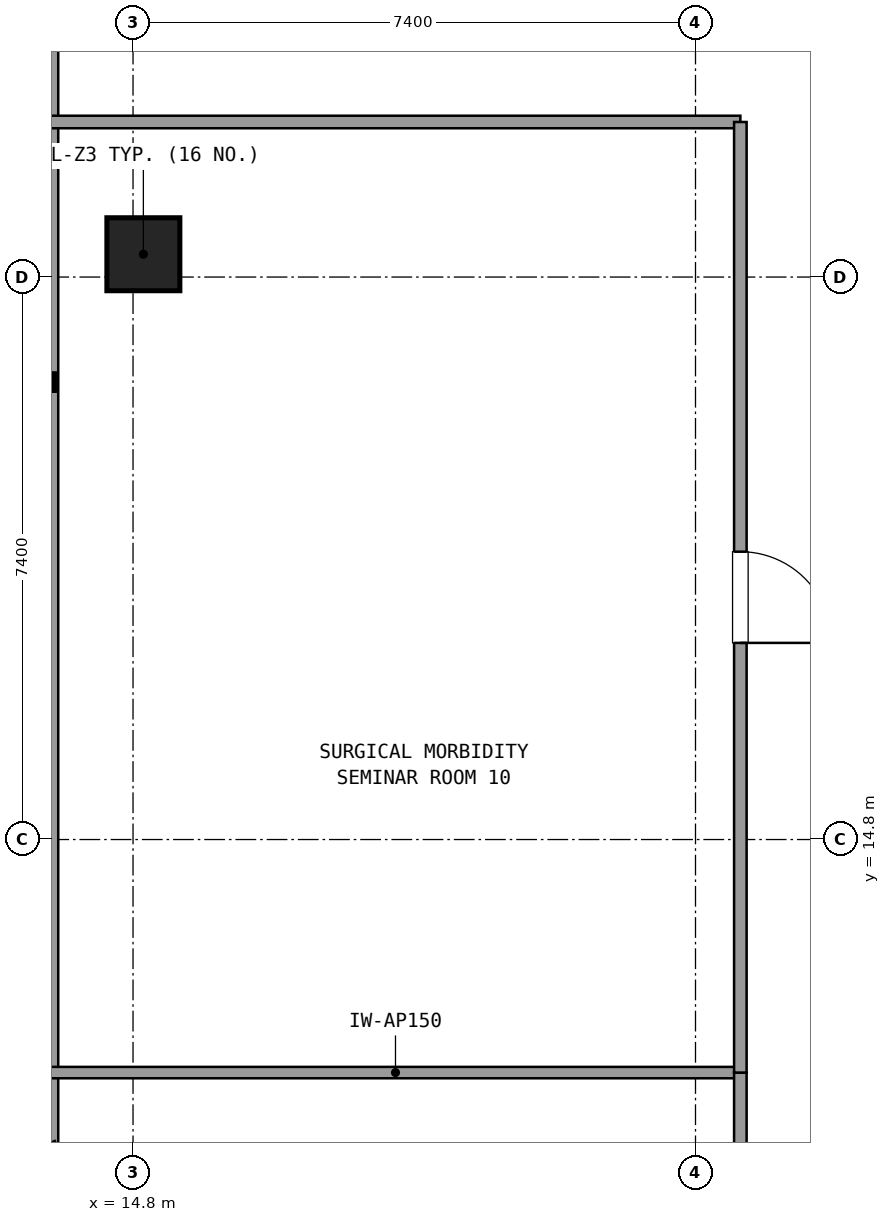
"""IFC4 building model, lengths in metres.
Left out: names, types, materials, properties, quantities, classifications, styles, units other than length and angle.
Written with IfcOpenShell. Run it as: python <this file> out.ifc"""

import sys

from ifc_helpers import new_model, si_unit, direction, frame, frame_2d, origin, origin_2d, place, context, subcontext, project, spatial, rectangle, extrude, element, fill, save


model = new_model("IFC4")
c1 = context("Model", 3, precision=1e-05, world=origin(), true_north=direction((0.0, 1.0)))
c2 = subcontext(c1, "Body", "Model", "MODEL_VIEW")
j1 = project(units=[si_unit("LENGTHUNIT", "METRE"), si_unit("PLANEANGLEUNIT", "RADIAN")], contexts=[c1])
p1 = place(None, origin())
s1 = spatial("IfcSite", under=j1, at=p1, CompositionType="ELEMENT")
p2 = place(p1, origin())
s2 = spatial("IfcBuilding", under=s1, at=p2, CompositionType="ELEMENT")
p3 = place(p2, frame((0.0, 0.0, 174.42)))
s3 = spatial("IfcBuildingStorey", under=s2, at=p3, CompositionType="ELEMENT", Elevation=174.42)
p4 = place(p3, frame((14.936, 22.5, 0.0), z_axis=(0.0, 0.0, 1.0), x_axis=(1.0, 0.0, 0.0)))
e1 = element("IfcColumn", 1, at=p4, inside=s3, PredefinedType="COLUMN", context=c2, shape_type="SweptSolid", body=[
    extrude(rectangle(XDim=0.96, YDim=0.96, at=origin_2d()), origin(), (0.0, 0.0, 1.0), 3.579),
])
p5 = place(p3, frame((13.696, 41.145, 0.0), z_axis=(0.0, 0.0, 1.0), x_axis=(0.0, -1.0, 0.0)))
e2 = element("IfcWall", 2, at=p5, inside=s3, PredefinedType="SOLIDWALL", context=c2, shape_type="SweptSolid", body=[
    extrude(rectangle(XDim=30.49, YDim=0.24, at=frame_2d((15.245, 0.0))), origin(), (0.0, 0.0, 1.0), 0.85),
])
p6 = place(p3, frame((13.716, 24.24, 0.0), z_axis=(0.0, 0.0, 1.0), x_axis=(1.0, 0.0, 0.0)))
e3 = element("IfcWall", 3, at=p6, inside=s3, PredefinedType="PARTITIONING", context=c2, shape_type="SweptSolid", body=[
    extrude(rectangle(XDim=9.074, YDim=0.165, at=frame_2d((4.537, 0.0))), origin(), (0.0, 0.0, 1.0), 2.59),
])
p7 = place(p3, frame((22.79, 11.734, 0.0), z_axis=(0.0, 0.0, 1.0), x_axis=(-1.0, 0.0, 0.0)))
e4 = element("IfcWall", 4, at=p7, inside=s3, PredefinedType="PARTITIONING", context=c2, shape_type="SweptSolid", body=[
    extrude(rectangle(XDim=9.074, YDim=0.15, at=frame_2d((4.537, 0.0))), origin(), (0.0, 0.0, 1.0), 2.59),
])
p8 = place(p3, frame((22.79, 4.7, 0.0), z_axis=(0.0, 0.0, 1.0), x_axis=(0.0, 1.0, 0.0)))
e5 = element("IfcWall", 5, at=p8, inside=s3, PredefinedType="PARTITIONING", context=c2, shape_type="SweptSolid", body=[
    extrude(rectangle(XDim=7.034, YDim=0.165, at=frame_2d((3.517, 0.0))), origin(), (0.0, 0.0, 1.0), 2.59),
])
p9 = place(p8, frame((2.917, 0.0, 0.0)))
e6 = element("IfcOpeningElement", 6, at=p9, cuts=e5, PredefinedType="OPENING", context=c2, shape_type="SweptSolid", body=[
    extrude(rectangle(XDim=1.2, YDim=2.15, at=frame_2d((0.6, 1.075))), frame((0.0, 0.093, 0.0), z_axis=(0.0, -1.0, 0.0), x_axis=(1.0, 0.0, 0.0)), (0.0, 0.0, 1.0), 0.185),
])
p10 = place(p3, frame((22.79, 11.734, 0.0), z_axis=(0.0, 0.0, 1.0), x_axis=(0.0, 1.0, 0.0)))
e7 = element("IfcWall", 7, at=p10, inside=s3, PredefinedType="PARTITIONING", context=c2, shape_type="SweptSolid", body=[
    extrude(rectangle(XDim=12.506, YDim=0.165, at=frame_2d((6.253, 0.0))), origin(), (0.0, 0.0, 1.0), 2.59),
])
p11 = place(p10, frame((5.653, 0.0, 0.0)))
e8 = element("IfcOpeningElement", 8, at=p11, cuts=e7, PredefinedType="OPENING", context=c2, shape_type="SweptSolid", body=[
    extrude(rectangle(XDim=1.2, YDim=2.15, at=frame_2d((0.6, 1.075))), frame((0.0, 0.093, 0.0), z_axis=(0.0, -1.0, 0.0), x_axis=(1.0, 0.0, 0.0)), (0.0, 0.0, 1.0), 0.185),
])
p12 = place(p11, frame((1.2, 0.0, 0.0), z_axis=(0.0, 0.0, 1.0), x_axis=(-1.0, 0.0, 0.0)))
e9 = element("IfcDoor", 9, at=p12, inside=s3, OperationType="SINGLE_SWING_LEFT", PredefinedType="DOOR", context=c2, shape_type="SweptSolid", body=[
    extrude(rectangle(XDim=1.2, YDim=2.15, at=frame_2d((0.6, 1.075))), frame((0.0, 0.025, 0.0), z_axis=(0.0, -1.0, 0.0), x_axis=(1.0, 0.0, 0.0)), (0.0, 0.0, 1.0), 0.05),
])
fill(e8, e9)
save(model, sys.argv[1])
